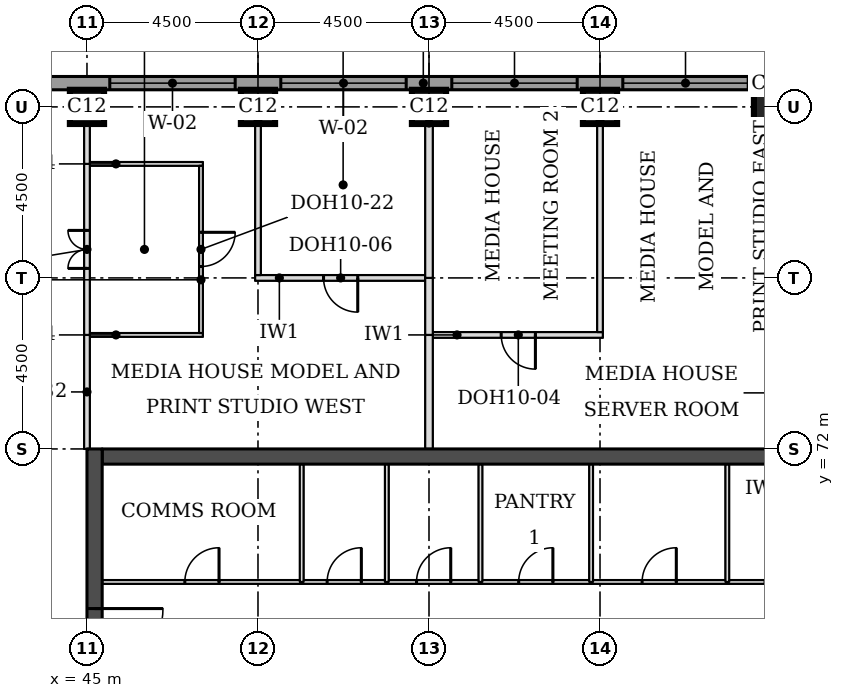
"""IFC4 building model, lengths in metres.
Left out: names, types, materials, properties, quantities, classifications, styles, units other than length and angle.
Written with IfcOpenShell. Run it as: python <this file> out.ifc"""

import sys

from ifc_helpers import new_model, si_unit, direction, frame, frame_2d, origin, origin_2d, place, context, subcontext, project, spatial, rectangle, extrude, element, fill, save


model = new_model("IFC4")
c1 = context("Model", 3, precision=1e-05, world=origin(), true_north=direction((0.0, 1.0)))
c2 = subcontext(c1, "Body", "Model", "MODEL_VIEW")
j1 = project(units=[si_unit("LENGTHUNIT", "METRE"), si_unit("PLANEANGLEUNIT", "RADIAN")], contexts=[c1])
p1 = place(None, origin())
s1 = spatial("IfcSite", under=j1, at=p1, CompositionType="ELEMENT")
p2 = place(p1, origin())
s2 = spatial("IfcBuilding", under=s1, at=p2, CompositionType="ELEMENT")
p3 = place(p2, frame((0.0, 0.0, 226.7)))
s3 = spatial("IfcBuildingStorey", under=s2, at=p3, CompositionType="ELEMENT", Elevation=226.7)
for number, where, z_axis, x_axis in (
    (1, (45.0, 81.0, 0.0), (0.0, 0.0, 1.0), (1.0, 0.0, 0.0)),
    (2, (49.5, 81.0, 0.0), (0.0, 0.0, 1.0), (1.0, 0.0, 0.0)),
    (3, (54.0, 81.0, 0.0), (0.0, 0.0, 1.0), (1.0, 0.0, 0.0)),
    (4, (58.5, 81.0, 0.0), (0.0, 0.0, 1.0), (1.0, 0.0, 0.0)),
    (5, (63.0, 81.0, 0.0), (0.0, 0.0, 1.0), (1.0, 0.0, 0.0)),
):
    element("IfcColumn", number, at=place(p3, frame(where, z_axis=z_axis, x_axis=x_axis)), inside=s3, PredefinedType="COLUMN", context=c2, shape_type="SweptSolid", body=[
        extrude(rectangle(XDim=0.9, YDim=0.9, at=origin_2d()), origin(), (0.0, 0.0, 1.0), 3.7),
    ])
p4 = place(p3, frame((45.4, 71.8, 0.0), z_axis=(0.0, 0.0, 1.0), x_axis=(1.0, 0.0, 0.0)))
e6 = element("IfcWall", 6, at=p4, inside=s3, PredefinedType="SHEAR", context=c2, shape_type="SweptSolid", body=[
    extrude(rectangle(XDim=21.7, YDim=0.4, at=frame_2d((10.85, 0.0))), origin(), (0.0, 0.0, 1.0), 3.7),
])
p5 = place(p3, frame((45.2, 49.5, 0.0), z_axis=(0.0, 0.0, 1.0), x_axis=(0.0, 1.0, 0.0)))
e7 = element("IfcWall", 7, at=p5, inside=s3, PredefinedType="SHEAR", context=c2, shape_type="SweptSolid", body=[
    extrude(rectangle(XDim=22.5, YDim=0.4, at=frame_2d((11.25, 0.0))), origin(), (0.0, 0.0, 1.0), 3.7),
])
p6 = place(p5, frame((4.2, 0.0, 0.0)))
e8 = element("IfcOpeningElement", 8, at=p6, cuts=e7, PredefinedType="OPENING", context=c2, shape_type="SweptSolid", body=[
    extrude(rectangle(XDim=1.8, YDim=2.1, at=frame_2d((0.9, 1.05))), frame((0.0, 0.21, 0.0), z_axis=(0.0, -1.0, 0.0), x_axis=(1.0, 0.0, 0.0)), (0.0, 0.0, 1.0), 0.42),
])
p7 = place(p5, frame((6.9, 0.0, 0.0)))
e9 = element("IfcOpeningElement", 9, at=p7, cuts=e7, PredefinedType="OPENING", context=c2, shape_type="SweptSolid", body=[
    extrude(rectangle(XDim=1.1, YDim=2.1, at=frame_2d((0.55, 1.05))), frame((0.0, 0.21, 0.0), z_axis=(0.0, -1.0, 0.0), x_axis=(1.0, 0.0, 0.0)), (0.0, 0.0, 1.0), 0.42),
])
p8 = place(p5, frame((13.6, 0.0, 0.0)))
e10 = element("IfcOpeningElement", 10, at=p8, cuts=e7, PredefinedType="OPENING", context=c2, shape_type="SweptSolid", body=[
    extrude(rectangle(XDim=1.1, YDim=2.1, at=frame_2d((0.55, 1.05))), frame((0.0, 0.21, 0.0), z_axis=(0.0, -1.0, 0.0), x_axis=(1.0, 0.0, 0.0)), (0.0, 0.0, 1.0), 0.42),
])
p9 = place(p5, frame((16.5, 0.0, 0.0)))
e11 = element("IfcOpeningElement", 11, at=p9, cuts=e7, PredefinedType="OPENING", context=c2, shape_type="SweptSolid", body=[
    extrude(rectangle(XDim=1.8, YDim=2.1, at=frame_2d((0.9, 1.05))), frame((0.0, 0.21, 0.0), z_axis=(0.0, -1.0, 0.0), x_axis=(1.0, 0.0, 0.0)), (0.0, 0.0, 1.0), 0.42),
])
p10 = place(p3, frame((72.331, 81.625, 0.0), z_axis=(0.0, 0.0, 1.0), x_axis=(-1.0, 0.0, 0.0)))
e12 = element("IfcWall", 12, at=p10, inside=s3, PredefinedType="STANDARD", context=c2, shape_type="SweptSolid", body=[
    extrude(rectangle(XDim=32.163, YDim=0.35, at=frame_2d((16.081, 0.0))), origin(), (0.0, 0.0, 1.0), 3.525),
])
p11 = place(p10, frame((5.431, 0.0, 0.9)))
e13 = element("IfcOpeningElement", 13, at=p11, cuts=e12, PredefinedType="OPENING", context=c2, shape_type="SweptSolid", body=[
    extrude(rectangle(XDim=3.3, YDim=1.9, at=frame_2d((1.65, 0.95))), frame((0.0, 0.185, 0.0), z_axis=(0.0, -1.0, 0.0), x_axis=(1.0, 0.0, 0.0)), (0.0, 0.0, 1.0), 0.37),
])
p12 = place(p10, frame((9.931, 0.0, 0.9)))
e14 = element("IfcOpeningElement", 14, at=p12, cuts=e12, PredefinedType="OPENING", context=c2, shape_type="SweptSolid", body=[
    extrude(rectangle(XDim=3.3, YDim=1.9, at=frame_2d((1.65, 0.95))), frame((0.0, 0.185, 0.0), z_axis=(0.0, -1.0, 0.0), x_axis=(1.0, 0.0, 0.0)), (0.0, 0.0, 1.0), 0.37),
])
p13 = place(p10, frame((14.431, 0.0, 0.9)))
e15 = element("IfcOpeningElement", 15, at=p13, cuts=e12, PredefinedType="OPENING", context=c2, shape_type="SweptSolid", body=[
    extrude(rectangle(XDim=3.3, YDim=1.9, at=frame_2d((1.65, 0.95))), frame((0.0, 0.185, 0.0), z_axis=(0.0, -1.0, 0.0), x_axis=(1.0, 0.0, 0.0)), (0.0, 0.0, 1.0), 0.37),
])
p14 = place(p10, frame((18.931, 0.0, 0.9)))
e16 = element("IfcOpeningElement", 16, at=p14, cuts=e12, PredefinedType="OPENING", context=c2, shape_type="SweptSolid", body=[
    extrude(rectangle(XDim=3.3, YDim=1.9, at=frame_2d((1.65, 0.95))), frame((0.0, 0.185, 0.0), z_axis=(0.0, -1.0, 0.0), x_axis=(1.0, 0.0, 0.0)), (0.0, 0.0, 1.0), 0.37),
])
p15 = place(p10, frame((23.431, 0.0, 0.9)))
e17 = element("IfcOpeningElement", 17, at=p15, cuts=e12, PredefinedType="OPENING", context=c2, shape_type="SweptSolid", body=[
    extrude(rectangle(XDim=3.3, YDim=1.9, at=frame_2d((1.65, 0.95))), frame((0.0, 0.185, 0.0), z_axis=(0.0, -1.0, 0.0), x_axis=(1.0, 0.0, 0.0)), (0.0, 0.0, 1.0), 0.37),
])
p16 = place(p3, frame((45.075, 75.0, 0.0), z_axis=(0.0, 0.0, 1.0), x_axis=(1.0, 0.0, 0.0)))
e18 = element("IfcWall", 18, at=p16, inside=s3, PredefinedType="PARTITIONING", context=c2, shape_type="SweptSolid", body=[
    extrude(rectangle(XDim=2.975, YDim=0.1, at=frame_2d((1.488, 0.0))), origin(), (0.0, 0.0, 1.0), 3.55),
])
p17 = place(p3, frame((54.1, 75.0, 0.0), z_axis=(0.0, 0.0, 1.0), x_axis=(1.0, 0.0, 0.0)))
e19 = element("IfcWall", 19, at=p17, inside=s3, PredefinedType="PARTITIONING", context=c2, shape_type="SweptSolid", body=[
    extrude(rectangle(XDim=4.475, YDim=0.15, at=frame_2d((2.237, 0.0))), origin(), (0.0, 0.0, 1.0), 3.55),
])
p18 = place(p17, frame((1.8, 0.0, 0.0)))
e20 = element("IfcOpeningElement", 20, at=p18, cuts=e19, PredefinedType="OPENING", context=c2, shape_type="SweptSolid", body=[
    extrude(rectangle(XDim=0.9, YDim=2.1, at=frame_2d((0.45, 1.05))), frame((0.0, 0.085, 0.0), z_axis=(0.0, -1.0, 0.0), x_axis=(1.0, 0.0, 0.0)), (0.0, 0.0, 1.0), 0.17),
])
p19 = place(p3, frame((49.425, 76.5, 0.0), z_axis=(0.0, 0.0, 1.0), x_axis=(1.0, 0.0, 0.0)))
e21 = element("IfcWall", 21, at=p19, inside=s3, PredefinedType="PARTITIONING", context=c2, shape_type="SweptSolid", body=[
    extrude(rectangle(XDim=4.475, YDim=0.15, at=frame_2d((2.237, 0.0))), origin(), (0.0, 0.0, 1.0), 3.55),
])
p20 = place(p19, frame((1.8, 0.0, 0.0)))
e22 = element("IfcOpeningElement", 22, at=p20, cuts=e21, PredefinedType="OPENING", context=c2, shape_type="SweptSolid", body=[
    extrude(rectangle(XDim=0.9, YDim=2.1, at=frame_2d((0.45, 1.05))), frame((0.0, 0.085, 0.0), z_axis=(0.0, -1.0, 0.0), x_axis=(1.0, 0.0, 0.0)), (0.0, 0.0, 1.0), 0.17),
])
p21 = place(p3, frame((45.075, 79.5, 0.0), z_axis=(0.0, 0.0, 1.0), x_axis=(1.0, 0.0, 0.0)))
e23 = element("IfcWall", 23, at=p21, inside=s3, PredefinedType="PARTITIONING", context=c2, shape_type="SweptSolid", body=[
    extrude(rectangle(XDim=2.975, YDim=0.1, at=frame_2d((1.488, 0.0))), origin(), (0.0, 0.0, 1.0), 3.55),
])
p22 = place(p3, frame((45.0, 72.0, 0.0), z_axis=(0.0, 0.0, 1.0), x_axis=(0.0, 1.0, 0.0)))
e24 = element("IfcWall", 24, at=p22, inside=s3, PredefinedType="PARTITIONING", context=c2, shape_type="SweptSolid", body=[
    extrude(rectangle(XDim=3.0, YDim=0.15, at=frame_2d((1.5, 0.0))), origin(), (0.0, 0.0, 1.0), 3.022),
])
p23 = place(p3, frame((54.0, 72.0, 0.0), z_axis=(0.0, 0.0, 1.0), x_axis=(0.0, 1.0, 0.0)))
e25 = element("IfcWall", 25, at=p23, inside=s3, PredefinedType="PARTITIONING", context=c2, shape_type="SweptSolid", body=[
    extrude(rectangle(XDim=3.0, YDim=0.2, at=frame_2d((1.5, 0.0))), origin(), (0.0, 0.0, 1.0), 3.55),
])
p24 = place(p3, frame((45.0, 75.0, 0.0), z_axis=(0.0, 0.0, 1.0), x_axis=(0.0, 1.0, 0.0)))
e26 = element("IfcWall", 26, at=p24, inside=s3, PredefinedType="PARTITIONING", context=c2, shape_type="SweptSolid", body=[
    extrude(rectangle(XDim=4.5, YDim=0.15, at=frame_2d((2.25, 0.0))), origin(), (0.0, 0.0, 1.0), 3.022),
])
p25 = place(p24, frame((1.75, 0.0, 0.0)))
e27 = element("IfcOpeningElement", 27, at=p25, cuts=e26, PredefinedType="OPENING", context=c2, shape_type="SweptSolid", body=[
    extrude(rectangle(XDim=1.0, YDim=2.1, at=frame_2d((0.5, 1.05))), frame((0.0, 0.085, 0.0), z_axis=(0.0, -1.0, 0.0), x_axis=(1.0, 0.0, 0.0)), (0.0, 0.0, 1.0), 0.17),
])
p26 = place(p3, frame((54.0, 75.0, 0.0), z_axis=(0.0, 0.0, 1.0), x_axis=(0.0, 1.0, 0.0)))
e28 = element("IfcWall", 28, at=p26, inside=s3, PredefinedType="PARTITIONING", context=c2, shape_type="SweptSolid", body=[
    extrude(rectangle(XDim=1.5, YDim=0.2, at=frame_2d((0.75, 0.0))), origin(), (0.0, 0.0, 1.0), 3.55),
])
p27 = place(p3, frame((48.0, 75.05, 0.0), z_axis=(0.0, 0.0, 1.0), x_axis=(0.0, 1.0, 0.0)))
e29 = element("IfcWall", 29, at=p27, inside=s3, PredefinedType="PARTITIONING", context=c2, shape_type="SweptSolid", body=[
    extrude(rectangle(XDim=4.4, YDim=0.1, at=frame_2d((2.2, 0.0))), origin(), (0.0, 0.0, 1.0), 3.55),
])
p28 = place(p27, frame((1.75, 0.0, 0.0)))
e30 = element("IfcOpeningElement", 30, at=p28, cuts=e29, PredefinedType="OPENING", context=c2, shape_type="SweptSolid", body=[
    extrude(rectangle(XDim=0.9, YDim=2.1, at=frame_2d((0.45, 1.05))), frame((0.0, 0.06, 0.0), z_axis=(0.0, -1.0, 0.0), x_axis=(1.0, 0.0, 0.0)), (0.0, 0.0, 1.0), 0.12),
])
p29 = place(p3, frame((58.5, 75.075, 0.0), z_axis=(0.0, 0.0, 1.0), x_axis=(0.0, 1.0, 0.0)))
e31 = element("IfcWall", 31, at=p29, inside=s3, PredefinedType="PARTITIONING", context=c2, shape_type="SweptSolid", body=[
    extrude(rectangle(XDim=6.375, YDim=0.15, at=frame_2d((3.188, 0.0))), origin(), (0.0, 0.0, 1.0), 3.55),
])
p30 = place(p3, frame((54.0, 76.5, 0.0), z_axis=(0.0, 0.0, 1.0), x_axis=(0.0, 1.0, 0.0)))
e32 = element("IfcWall", 32, at=p30, inside=s3, PredefinedType="PARTITIONING", context=c2, shape_type="SweptSolid", body=[
    extrude(rectangle(XDim=4.95, YDim=0.2, at=frame_2d((2.475, 0.0))), origin(), (0.0, 0.0, 1.0), 3.55),
])
p31 = place(p3, frame((49.5, 76.575, 0.0), z_axis=(0.0, 0.0, 1.0), x_axis=(0.0, 1.0, 0.0)))
e33 = element("IfcWall", 33, at=p31, inside=s3, PredefinedType="PARTITIONING", context=c2, shape_type="SweptSolid", body=[
    extrude(rectangle(XDim=4.875, YDim=0.15, at=frame_2d((2.438, 0.0))), origin(), (0.0, 0.0, 1.0), 3.55),
])
p32 = place(p3, frame((45.0, 79.5, 0.0), z_axis=(0.0, 0.0, 1.0), x_axis=(0.0, 1.0, 0.0)))
e34 = element("IfcWall", 34, at=p32, inside=s3, PredefinedType="PARTITIONING", context=c2, shape_type="SweptSolid", body=[
    extrude(rectangle(XDim=1.95, YDim=0.15, at=frame_2d((0.975, 0.0))), origin(), (0.0, 0.0, 1.0), 3.022),
])
p33 = place(p3, frame((45.4, 68.5, 0.0), z_axis=(0.0, 0.0, 1.0), x_axis=(1.0, 0.0, 0.0)))
e35 = element("IfcWall", 35, at=p33, inside=s3, PredefinedType="PARTITIONING", context=c2, shape_type="SweptSolid", body=[
    extrude(rectangle(XDim=21.7, YDim=0.1, at=frame_2d((10.85, 0.0))), origin(), (0.0, 0.0, 1.0), 3.55),
])
p34 = place(p33, frame((20.069, 0.0, 0.0)))
e36 = element("IfcOpeningElement", 36, at=p34, cuts=e35, PredefinedType="OPENING", context=c2, shape_type="SweptSolid", body=[
    extrude(rectangle(XDim=0.9, YDim=2.1, at=frame_2d((0.45, 1.05))), frame((0.0, 0.06, 0.0), z_axis=(0.0, -1.0, 0.0), x_axis=(1.0, 0.0, 0.0)), (0.0, 0.0, 1.0), 0.12),
])
p35 = place(p33, frame((17.444, 0.0, 0.0)))
e37 = element("IfcOpeningElement", 37, at=p35, cuts=e35, PredefinedType="OPENING", context=c2, shape_type="SweptSolid", body=[
    extrude(rectangle(XDim=0.9, YDim=2.1, at=frame_2d((0.45, 1.05))), frame((0.0, 0.06, 0.0), z_axis=(0.0, -1.0, 0.0), x_axis=(1.0, 0.0, 0.0)), (0.0, 0.0, 1.0), 0.12),
])
p36 = place(p33, frame((2.175, 0.0, 0.0)))
e38 = element("IfcOpeningElement", 38, at=p36, cuts=e35, PredefinedType="OPENING", context=c2, shape_type="SweptSolid", body=[
    extrude(rectangle(XDim=0.9, YDim=2.1, at=frame_2d((0.45, 1.05))), frame((0.0, 0.06, 0.0), z_axis=(0.0, -1.0, 0.0), x_axis=(1.0, 0.0, 0.0)), (0.0, 0.0, 1.0), 0.12),
])
p37 = place(p33, frame((14.208, 0.0, 0.0)))
e39 = element("IfcOpeningElement", 39, at=p37, cuts=e35, PredefinedType="OPENING", context=c2, shape_type="SweptSolid", body=[
    extrude(rectangle(XDim=0.9, YDim=2.1, at=frame_2d((0.45, 1.05))), frame((0.0, 0.06, 0.0), z_axis=(0.0, -1.0, 0.0), x_axis=(1.0, 0.0, 0.0)), (0.0, 0.0, 1.0), 0.12),
])
p38 = place(p33, frame((10.96, 0.0, 0.0)))
e40 = element("IfcOpeningElement", 40, at=p38, cuts=e35, PredefinedType="OPENING", context=c2, shape_type="SweptSolid", body=[
    extrude(rectangle(XDim=0.9, YDim=2.1, at=frame_2d((0.45, 1.05))), frame((0.0, 0.06, 0.0), z_axis=(0.0, -1.0, 0.0), x_axis=(1.0, 0.0, 0.0)), (0.0, 0.0, 1.0), 0.12),
])
p39 = place(p33, frame((8.272, 0.0, 0.0)))
e41 = element("IfcOpeningElement", 41, at=p39, cuts=e35, PredefinedType="OPENING", context=c2, shape_type="SweptSolid", body=[
    extrude(rectangle(XDim=0.9, YDim=2.1, at=frame_2d((0.45, 1.05))), frame((0.0, 0.06, 0.0), z_axis=(0.0, -1.0, 0.0), x_axis=(1.0, 0.0, 0.0)), (0.0, 0.0, 1.0), 0.12),
])
p40 = place(p33, frame((5.92, 0.0, 0.0)))
e42 = element("IfcOpeningElement", 42, at=p40, cuts=e35, PredefinedType="OPENING", context=c2, shape_type="SweptSolid", body=[
    extrude(rectangle(XDim=0.9, YDim=2.1, at=frame_2d((0.45, 1.05))), frame((0.0, 0.06, 0.0), z_axis=(0.0, -1.0, 0.0), x_axis=(1.0, 0.0, 0.0)), (0.0, 0.0, 1.0), 0.12),
])
for number, where, z_axis, x_axis in (
    (43, (50.65, 68.5, 0.0), (0.0, 0.0, 1.0), (0.0, 1.0, 0.0)),
    (44, (52.89, 68.5, 0.0), (0.0, 0.0, 1.0), (0.0, 1.0, 0.0)),
    (45, (55.354, 68.5, 0.0), (0.0, 0.0, 1.0), (0.0, 1.0, 0.0)),
    (46, (58.266, 68.5, 0.0), (0.0, 0.0, 1.0), (0.0, 1.0, 0.0)),
    (47, (61.85, 68.5, 0.0), (0.0, 0.0, 1.0), (0.0, 1.0, 0.0)),
):
    element("IfcWall", number, at=place(p3, frame(where, z_axis=z_axis, x_axis=x_axis)), inside=s3, PredefinedType="PARTITIONING", context=c2, shape_type="SweptSolid", body=[
        extrude(rectangle(XDim=3.1, YDim=0.1, at=frame_2d((1.55, 0.0))), origin(), (0.0, 0.0, 1.0), 3.55),
    ])
p41 = place(p12, origin())
e48 = element("IfcWindow", 48, at=p41, inside=s3, PartitioningType="SINGLE_PANEL", PredefinedType="WINDOW", context=c2, shape_type="SweptSolid", body=[
    extrude(rectangle(XDim=3.3, YDim=1.9, at=frame_2d((1.65, 0.95))), frame((0.0, 0.085, 0.0), z_axis=(0.0, -1.0, 0.0), x_axis=(1.0, 0.0, 0.0)), (0.0, 0.0, 1.0), 0.06),
])
fill(e14, e48)
p42 = place(p13, origin())
e49 = element("IfcWindow", 49, at=p42, inside=s3, PartitioningType="SINGLE_PANEL", PredefinedType="WINDOW", context=c2, shape_type="SweptSolid", body=[
    extrude(rectangle(XDim=3.3, YDim=1.9, at=frame_2d((1.65, 0.95))), frame((0.0, 0.085, 0.0), z_axis=(0.0, -1.0, 0.0), x_axis=(1.0, 0.0, 0.0)), (0.0, 0.0, 1.0), 0.06),
])
fill(e15, e49)
p43 = place(p14, origin())
e50 = element("IfcWindow", 50, at=p43, inside=s3, PartitioningType="SINGLE_PANEL", PredefinedType="WINDOW", context=c2, shape_type="SweptSolid", body=[
    extrude(rectangle(XDim=3.3, YDim=1.9, at=frame_2d((1.65, 0.95))), frame((0.0, 0.085, 0.0), z_axis=(0.0, -1.0, 0.0), x_axis=(1.0, 0.0, 0.0)), (0.0, 0.0, 1.0), 0.06),
])
fill(e16, e50)
p44 = place(p15, origin())
e51 = element("IfcWindow", 51, at=p44, inside=s3, PartitioningType="SINGLE_PANEL", PredefinedType="WINDOW", context=c2, shape_type="SweptSolid", body=[
    extrude(rectangle(XDim=3.3, YDim=1.9, at=frame_2d((1.65, 0.95))), frame((0.0, 0.085, 0.0), z_axis=(0.0, -1.0, 0.0), x_axis=(1.0, 0.0, 0.0)), (0.0, 0.0, 1.0), 0.06),
])
fill(e17, e51)
p45 = place(p25, origin())
e52 = element("IfcDoor", 52, at=p45, inside=s3, OperationType="DOUBLE_DOOR_SINGLE_SWING", PredefinedType="DOOR", context=c2, shape_type="SweptSolid", body=[
    extrude(rectangle(XDim=1.0, YDim=2.1, at=frame_2d((0.5, 1.05))), frame((0.0, 0.025, 0.0), z_axis=(0.0, -1.0, 0.0), x_axis=(1.0, 0.0, 0.0)), (0.0, 0.0, 1.0), 0.05),
])
fill(e27, e52)
p46 = place(p28, frame((0.9, 0.0, 0.0), z_axis=(0.0, 0.0, 1.0), x_axis=(-1.0, 0.0, 0.0)))
e53 = element("IfcDoor", 53, at=p46, inside=s3, OperationType="SINGLE_SWING_LEFT", PredefinedType="DOOR", context=c2, shape_type="SweptSolid", body=[
    extrude(rectangle(XDim=0.9, YDim=2.1, at=frame_2d((0.45, 1.05))), frame((0.0, 0.025, 0.0), z_axis=(0.0, -1.0, 0.0), x_axis=(1.0, 0.0, 0.0)), (0.0, 0.0, 1.0), 0.05),
])
fill(e30, e53)
p47 = place(p20, frame((0.9, 0.0, 0.0), z_axis=(0.0, 0.0, 1.0), x_axis=(-1.0, 0.0, 0.0)))
e54 = element("IfcDoor", 54, at=p47, inside=s3, OperationType="SINGLE_SWING_LEFT", PredefinedType="DOOR", context=c2, shape_type="SweptSolid", body=[
    extrude(rectangle(XDim=0.9, YDim=2.1, at=frame_2d((0.45, 1.05))), frame((0.0, 0.025, 0.0), z_axis=(0.0, -1.0, 0.0), x_axis=(1.0, 0.0, 0.0)), (0.0, 0.0, 1.0), 0.05),
])
fill(e22, e54)
p48 = place(p18, frame((0.9, 0.0, 0.0), z_axis=(0.0, 0.0, 1.0), x_axis=(-1.0, 0.0, 0.0)))
e55 = element("IfcDoor", 55, at=p48, inside=s3, OperationType="SINGLE_SWING_LEFT", PredefinedType="DOOR", context=c2, shape_type="SweptSolid", body=[
    extrude(rectangle(XDim=0.9, YDim=2.1, at=frame_2d((0.45, 1.05))), frame((0.0, 0.025, 0.0), z_axis=(0.0, -1.0, 0.0), x_axis=(1.0, 0.0, 0.0)), (0.0, 0.0, 1.0), 0.05),
])
fill(e20, e55)
p49 = place(p9, frame((1.8, 0.0, 0.0), z_axis=(0.0, 0.0, 1.0), x_axis=(-1.0, 0.0, 0.0)))
e56 = element("IfcDoor", 56, at=p49, inside=s3, OperationType="SINGLE_SWING_LEFT", PredefinedType="DOOR", context=c2, shape_type="SweptSolid", body=[
    extrude(rectangle(XDim=1.8, YDim=2.1, at=frame_2d((0.9, 1.05))), frame((0.0, 0.025, 0.0), z_axis=(0.0, -1.0, 0.0), x_axis=(1.0, 0.0, 0.0)), (0.0, 0.0, 1.0), 0.05),
])
fill(e11, e56)
p50 = place(p36, origin())
e57 = element("IfcDoor", 57, at=p50, inside=s3, OperationType="SINGLE_SWING_RIGHT", PredefinedType="DOOR", context=c2, shape_type="SweptSolid", body=[
    extrude(rectangle(XDim=0.9, YDim=2.1, at=frame_2d((0.45, 1.05))), frame((0.0, 0.025, 0.0), z_axis=(0.0, -1.0, 0.0), x_axis=(1.0, 0.0, 0.0)), (0.0, 0.0, 1.0), 0.05),
])
fill(e38, e57)
p51 = place(p37, origin())
e58 = element("IfcDoor", 58, at=p51, inside=s3, OperationType="SINGLE_SWING_RIGHT", PredefinedType="DOOR", context=c2, shape_type="SweptSolid", body=[
    extrude(rectangle(XDim=0.9, YDim=2.1, at=frame_2d((0.45, 1.05))), frame((0.0, 0.025, 0.0), z_axis=(0.0, -1.0, 0.0), x_axis=(1.0, 0.0, 0.0)), (0.0, 0.0, 1.0), 0.05),
])
fill(e39, e58)
p52 = place(p38, origin())
e59 = element("IfcDoor", 59, at=p52, inside=s3, OperationType="SINGLE_SWING_RIGHT", PredefinedType="DOOR", context=c2, shape_type="SweptSolid", body=[
    extrude(rectangle(XDim=0.9, YDim=2.1, at=frame_2d((0.45, 1.05))), frame((0.0, 0.025, 0.0), z_axis=(0.0, -1.0, 0.0), x_axis=(1.0, 0.0, 0.0)), (0.0, 0.0, 1.0), 0.05),
])
fill(e40, e59)
p53 = place(p39, origin())
e60 = element("IfcDoor", 60, at=p53, inside=s3, OperationType="SINGLE_SWING_RIGHT", PredefinedType="DOOR", context=c2, shape_type="SweptSolid", body=[
    extrude(rectangle(XDim=0.9, YDim=2.1, at=frame_2d((0.45, 1.05))), frame((0.0, 0.025, 0.0), z_axis=(0.0, -1.0, 0.0), x_axis=(1.0, 0.0, 0.0)), (0.0, 0.0, 1.0), 0.05),
])
fill(e41, e60)
p54 = place(p40, origin())
e61 = element("IfcDoor", 61, at=p54, inside=s3, OperationType="SINGLE_SWING_RIGHT", PredefinedType="DOOR", context=c2, shape_type="SweptSolid", body=[
    extrude(rectangle(XDim=0.9, YDim=2.1, at=frame_2d((0.45, 1.05))), frame((0.0, 0.025, 0.0), z_axis=(0.0, -1.0, 0.0), x_axis=(1.0, 0.0, 0.0)), (0.0, 0.0, 1.0), 0.05),
])
fill(e42, e61)
save(model, sys.argv[1])
